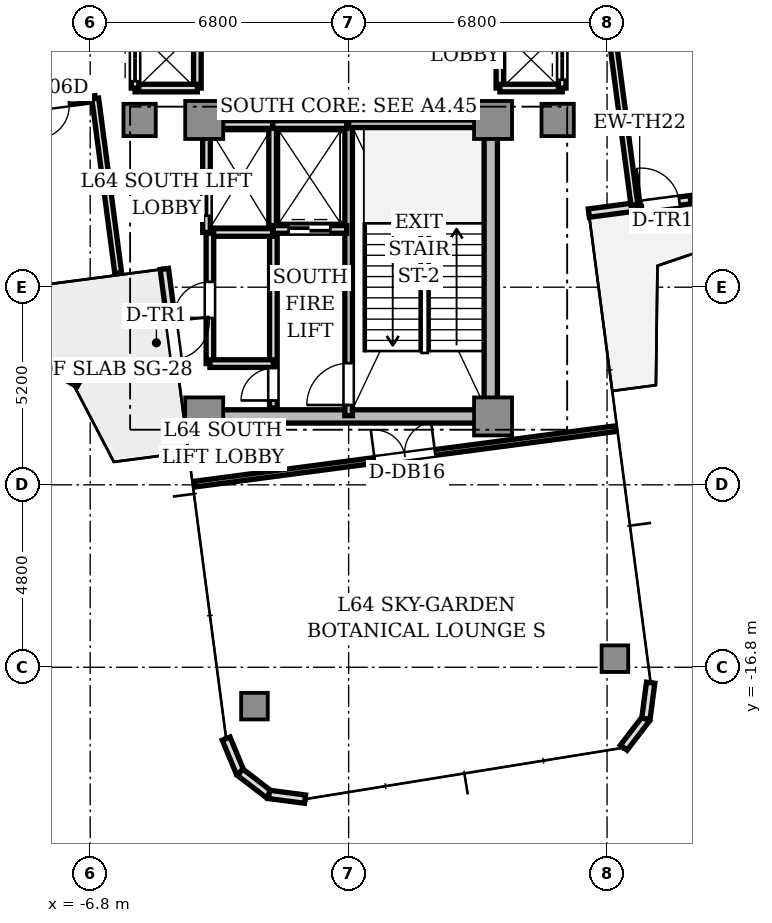
"""IFC4 building model, lengths in metres.
Left out: names, types, materials, properties, quantities, classifications, styles, units other than length and angle.
Written with IfcOpenShell. Run it as: python <this file> out.ifc"""

import sys

from ifc_helpers import new_model, si_unit, direction, frame, frame_2d, origin, origin_2d, place, context, subcontext, project, spatial, rectangle, extrude, source, transform, mapped, element, fill, save


model = new_model("IFC4")
c1 = context("Model", 3, precision=1e-05, world=origin(), true_north=direction((0.0, 1.0)))
c2 = subcontext(c1, "Body", "Model", "MODEL_VIEW")
j1 = project(units=[si_unit("LENGTHUNIT", "METRE"), si_unit("PLANEANGLEUNIT", "RADIAN")], contexts=[c1])
p1 = place(None, origin())
s1 = spatial("IfcSite", under=j1, at=p1, CompositionType="ELEMENT")
p2 = place(p1, origin())
s2 = spatial("IfcBuilding", under=s1, at=p2, CompositionType="ELEMENT")
p3 = place(p2, frame((0.0, 0.0, 229.95)))
s3 = spatial("IfcBuildingStorey", under=s2, at=p3, CompositionType="ELEMENT", Elevation=229.95)
p4 = place(p3, frame((-3.55, -10.2, 0.0), z_axis=(0.0, 0.0, 1.0), x_axis=(1.0, 0.0, 0.0)))
e1 = element("IfcWall", 1, at=p4, inside=s3, PredefinedType="SHEAR", context=c2, shape_type="SweptSolid", body=[
    extrude(rectangle(XDim=7.1, YDim=0.35, at=frame_2d((3.55, 0.0))), origin(), (0.0, 0.0, 1.0), 4.26),
])
p5 = place(p3, frame((3.74, -9.75, 0.0), z_axis=(0.0, 0.0, 1.0), x_axis=(0.0, 1.0, 0.0)))
e2 = element("IfcWall", 2, at=p5, inside=s3, PredefinedType="SHEAR", context=c2, shape_type="SweptSolid", body=[
    extrude(rectangle(XDim=6.9, YDim=0.35, at=frame_2d((3.45, 0.0))), origin(), (0.0, 0.0, 1.0), 4.26),
])
m1 = source(origin(), c2, "Body", "SweptSolid", [
    extrude(rectangle(XDim=1.0, YDim=1.0, at=origin_2d()), origin(), (0.0, 0.0, 1.0), 4.26),
])
for number, where, z_axis, x_axis in (
    (3, (-3.8, -2.4, 0.0), (0.0, 0.0, 1.0), (1.0, 0.0, 0.0)),
    (4, (3.8, -2.4, 0.0), (0.0, 0.0, 1.0), (1.0, 0.0, 0.0)),
    (5, (-3.8, -10.2, 0.0), (0.0, 0.0, 1.0), (1.0, 0.0, 0.0)),
    (6, (3.8, -10.2, 0.0), (0.0, 0.0, 1.0), (1.0, 0.0, 0.0)),
):
    element("IfcColumn", number, at=place(p3, frame(where, z_axis=z_axis, x_axis=x_axis)), inside=s3, PredefinedType="COLUMN", context=c2, shape_type="MappedRepresentation", body=[
        mapped(m1, transform((0.0, 0.0, 0.0), scale=1.0)),
    ])
m2 = source(origin(), c2, "Body", "SweptSolid", [
    extrude(rectangle(XDim=0.85, YDim=0.85, at=origin_2d()), origin(), (0.0, 0.0, 1.0), 4.26),
])
for number, where, z_axis, x_axis in (
    (7, (5.5, -2.4, 0.0), (0.0, 0.0, 1.0), (1.0, 0.0, 0.0)),
    (8, (-5.5, -2.4, 0.0), (0.0, 0.0, 1.0), (1.0, 0.0, 0.0)),
):
    element("IfcColumn", number, at=place(p3, frame(where, z_axis=z_axis, x_axis=x_axis)), inside=s3, PredefinedType="COLUMN", context=c2, shape_type="MappedRepresentation", body=[
        mapped(m2, transform((0.0, 0.0, 0.0), scale=1.0)),
    ])
m3 = source(origin(), c2, "Body", "SweptSolid", [
    extrude(rectangle(XDim=0.7, YDim=0.7, at=origin_2d()), origin(), (0.0, 0.0, 1.0), 4.26),
])
for number, where, z_axis, x_axis in (
    (9, (-2.478, -17.823, 0.0), (0.0, 0.0, 1.0), (1.0, 0.0, 0.0)),
    (10, (7.006, -16.574, 0.0), (0.0, 0.0, 1.0), (1.0, 0.0, 0.0)),
):
    element("IfcColumn", number, at=place(p3, frame(where, z_axis=z_axis, x_axis=x_axis)), inside=s3, PredefinedType="COLUMN", context=c2, shape_type="MappedRepresentation", body=[
        mapped(m3, transform((0.0, 0.0, 0.0), scale=1.0)),
    ])
p6 = place(p3, frame((6.32, -4.85, 0.0), z_axis=(0.0, 0.0, 1.0), x_axis=(0.991451525486, 0.130475563272, 0.0)))
e11 = element("IfcWall", 11, at=p6, inside=s3, PredefinedType="STANDARD", context=c2, shape_type="SweptSolid", body=[
    extrude(rectangle(XDim=2.7, YDim=0.22, at=frame_2d((1.35, 0.0))), origin(), (0.0, 0.0, 1.0), 4.26),
])
p7 = place(p6, frame((1.4, 0.0, 0.0)))
e12 = element("IfcOpeningElement", 12, at=p7, cuts=e11, PredefinedType="OPENING", context=c2, shape_type="SweptSolid", body=[
    extrude(rectangle(XDim=1.0, YDim=2.2, at=frame_2d((0.5, 1.1))), frame((0.0, 0.12, 0.0), z_axis=(0.0, -1.0, 0.0), x_axis=(1.0, 0.0, 0.0)), (0.0, 0.0, 1.0), 0.24),
])
p8 = place(p3, frame((-4.85, -6.32, 0.0), z_axis=(0.0, 0.0, 1.0), x_axis=(0.130475563272, -0.991451525486, 0.0)))
e13 = element("IfcWall", 13, at=p8, inside=s3, PredefinedType="STANDARD", context=c2, shape_type="SweptSolid", body=[
    extrude(rectangle(XDim=2.7, YDim=0.22, at=frame_2d((1.35, 0.0))), origin(), (0.0, 0.0, 1.0), 4.26),
])
p9 = place(p8, frame((1.4, 0.0, 0.0)))
e14 = element("IfcOpeningElement", 14, at=p9, cuts=e13, PredefinedType="OPENING", context=c2, shape_type="SweptSolid", body=[
    extrude(rectangle(XDim=1.0, YDim=2.2, at=frame_2d((0.5, 1.1))), frame((0.0, 0.12, 0.0), z_axis=(0.0, -1.0, 0.0), x_axis=(1.0, 0.0, 0.0)), (0.0, 0.0, 1.0), 0.24),
])
p10 = place(p3, frame((-3.223, -18.677, 0.0), z_axis=(0.0, 0.0, 1.0), x_axis=(0.382659506909, -0.923889442397, 0.0)))
e15 = element("IfcWall", 15, at=p10, inside=s3, PredefinedType="STANDARD", context=c2, shape_type="SweptSolid", body=[
    extrude(rectangle(XDim=0.958, YDim=0.22, at=frame_2d((0.479, 0.0))), origin(), (0.0, 0.0, 1.0), 4.26),
])
p11 = place(p3, frame((-2.856, -19.562, 0.0), z_axis=(0.0, 0.0, 1.0), x_axis=(0.793466811674, -0.60861352168, 0.0)))
e16 = element("IfcWall", 16, at=p11, inside=s3, PredefinedType="STANDARD", context=c2, shape_type="SweptSolid", body=[
    extrude(rectangle(XDim=0.958, YDim=0.22, at=frame_2d((0.479, 0.0))), origin(), (0.0, 0.0, 1.0), 4.26),
])
p12 = place(p3, frame((-2.096, -20.145, 0.0), z_axis=(0.0, 0.0, 1.0), x_axis=(0.991444747987, -0.130527053476, 0.0)))
e17 = element("IfcWall", 17, at=p12, inside=s3, PredefinedType="STANDARD", context=c2, shape_type="SweptSolid", body=[
    extrude(rectangle(XDim=0.958, YDim=0.22, at=frame_2d((0.479, 0.0))), origin(), (0.0, 0.0, 1.0), 4.26),
])
p13 = place(p3, frame((7.239, -18.916, 0.0), z_axis=(0.0, 0.0, 1.0), x_axis=(0.608897151398, 0.793249178392, 0.0)))
e18 = element("IfcWall", 18, at=p13, inside=s3, PredefinedType="STANDARD", context=c2, shape_type="SweptSolid", body=[
    extrude(rectangle(XDim=0.958, YDim=0.22, at=frame_2d((0.479, 0.0))), origin(), (0.0, 0.0, 1.0), 4.26),
])
p14 = place(p3, frame((7.822, -18.156, 0.0), z_axis=(0.0, 0.0, 1.0), x_axis=(0.130494070426, 0.991449089759, 0.0)))
e19 = element("IfcWall", 19, at=p14, inside=s3, PredefinedType="STANDARD", context=c2, shape_type="SweptSolid", body=[
    extrude(rectangle(XDim=0.958, YDim=0.22, at=frame_2d((0.479, 0.0))), origin(), (0.0, 0.0, 1.0), 4.26),
])
p15 = place(p3, frame((-7.985, -8.808, 0.0), z_axis=(0.0, 0.0, 1.0), x_axis=(0.862787227529, -0.505567206227, 0.0)))
e20 = element("IfcWall", 20, at=p15, inside=s3, PredefinedType="PARAPET", context=c2, shape_type="SweptSolid", body=[
    extrude(rectangle(XDim=1.029, YDim=0.2, at=frame_2d((0.514, 0.0))), origin(), (0.0, 0.0, 1.0), 0.65),
])
p16 = place(p3, frame((0.0, -10.18, 0.0), z_axis=(0.0, 0.0, 1.0), x_axis=(0.0, 1.0, 0.0)))
e21 = element("IfcWall", 21, at=p16, inside=s3, PredefinedType="SOLIDWALL", context=c2, shape_type="SweptSolid", body=[
    extrude(rectangle(XDim=7.68, YDim=0.2, at=frame_2d((3.84, 0.0))), origin(), (0.0, 0.0, 1.0), 4.26),
])
p17 = place(p16, frame((0.28, 0.0, 0.0)))
e22 = element("IfcOpeningElement", 22, at=p17, cuts=e21, PredefinedType="OPENING", context=c2, shape_type="SweptSolid", body=[
    extrude(rectangle(XDim=1.1, YDim=2.15, at=frame_2d((0.55, 1.075))), frame((0.0, 0.11, 0.0), z_axis=(0.0, -1.0, 0.0), x_axis=(1.0, 0.0, 0.0)), (0.0, 0.0, 1.0), 0.22),
])
p18 = place(p3, frame((0.0, -2.5, 0.0), z_axis=(0.0, 0.0, 1.0), x_axis=(1.0, 0.0, 0.0)))
e23 = element("IfcWall", 23, at=p18, inside=s3, PredefinedType="SOLIDWALL", context=c2, shape_type="SweptSolid", body=[
    extrude(rectangle(XDim=3.72, YDim=0.2, at=frame_2d((1.86, 0.0))), origin(), (0.0, 0.0, 1.0), 4.26),
])
p19 = place(p3, frame((-1.98, -9.98, 0.0), z_axis=(0.0, 0.0, 1.0), x_axis=(0.0, 1.0, 0.0)))
e24 = element("IfcWall", 24, at=p19, inside=s3, PredefinedType="SOLIDWALL", context=c2, shape_type="SweptSolid", body=[
    extrude(rectangle(XDim=4.66, YDim=0.2, at=frame_2d((2.33, 0.0))), origin(), (0.0, 0.0, 1.0), 3.81),
])
p20 = place(p19, frame((0.2, 0.0, 0.0)))
e25 = element("IfcOpeningElement", 25, at=p20, cuts=e24, PredefinedType="OPENING", context=c2, shape_type="SweptSolid", body=[
    extrude(rectangle(XDim=0.85, YDim=2.1, at=frame_2d((0.425, 1.05))), frame((0.0, 0.11, 0.0), z_axis=(0.0, -1.0, 0.0), x_axis=(1.0, 0.0, 0.0)), (0.0, 0.0, 1.0), 0.22),
])
p21 = place(p3, frame((-2.0, -5.28, 0.0), z_axis=(0.0, 0.0, 1.0), x_axis=(0.0, 1.0, 0.0)))
e26 = element("IfcWall", 26, at=p21, inside=s3, PredefinedType="SOLIDWALL", context=c2, shape_type="SweptSolid", body=[
    extrude(rectangle(XDim=2.78, YDim=0.2, at=frame_2d((1.39, 0.0))), origin(), (0.0, 0.0, 1.0), 3.81),
])
p22 = place(p3, frame((-2.0, -2.52, 0.0), z_axis=(0.0, 0.0, 1.0), x_axis=(1.0, 0.0, 0.0)))
e27 = element("IfcWall", 27, at=p22, inside=s3, PredefinedType="SOLIDWALL", context=c2, shape_type="SweptSolid", body=[
    extrude(rectangle(XDim=1.95, YDim=0.2, at=frame_2d((0.975, 0.0))), origin(), (0.0, 0.0, 1.0), 3.81),
])
p23 = place(p3, frame((-1.98, -5.28, 0.0), z_axis=(0.0, 0.0, 1.0), x_axis=(1.0, 0.0, 0.0)))
e28 = element("IfcWall", 28, at=p23, inside=s3, PredefinedType="SOLIDWALL", context=c2, shape_type="SweptSolid", body=[
    extrude(rectangle(XDim=1.93, YDim=0.2, at=frame_2d((0.965, 0.0))), origin(), (0.0, 0.0, 1.0), 3.81),
])
p24 = place(p23, frame((0.4, 0.0, 0.0)))
e29 = element("IfcOpeningElement", 29, at=p24, cuts=e28, PredefinedType="OPENING", context=c2, shape_type="SweptSolid", body=[
    extrude(rectangle(XDim=1.1, YDim=2.2, at=frame_2d((0.55, 1.1))), frame((0.0, 0.11, 0.0), z_axis=(0.0, -1.0, 0.0), x_axis=(1.0, 0.0, 0.0)), (0.0, 0.0, 1.0), 0.22),
])
p25 = place(p3, frame((-3.32, -2.52, 0.0), z_axis=(0.0, 0.0, 1.0), x_axis=(1.0, 0.0, 0.0)))
e30 = element("IfcWall", 30, at=p25, inside=s3, PredefinedType="SOLIDWALL", context=c2, shape_type="SweptSolid", body=[
    extrude(rectangle(XDim=1.32, YDim=0.2, at=frame_2d((0.66, 0.0))), origin(), (0.0, 0.0, 1.0), 3.81),
])
p26 = place(p3, frame((-3.74, -5.36, 0.0), z_axis=(0.0, 0.0, 1.0), x_axis=(1.0, 0.0, 0.0)))
e31 = element("IfcWall", 31, at=p26, inside=s3, PredefinedType="SOLIDWALL", context=c2, shape_type="SweptSolid", body=[
    extrude(rectangle(XDim=1.74, YDim=0.2, at=frame_2d((0.87, 0.0))), origin(), (0.0, 0.0, 1.0), 3.81),
])
p27 = place(p3, frame((-3.74, -5.36, 0.0), z_axis=(0.0, 0.0, 1.0), x_axis=(0.0, 1.0, 0.0)))
e32 = element("IfcWall", 32, at=p27, inside=s3, PredefinedType="SOLIDWALL", context=c2, shape_type="SweptSolid", body=[
    extrude(rectangle(XDim=2.48, YDim=0.2, at=frame_2d((1.24, 0.0))), origin(), (0.0, 0.0, 1.0), 3.81),
])
p28 = place(p27, frame((0.44, 0.0, 0.0)))
e33 = element("IfcOpeningElement", 33, at=p28, cuts=e32, PredefinedType="OPENING", context=c2, shape_type="SweptSolid", body=[
    extrude(rectangle(XDim=1.2, YDim=2.2, at=frame_2d((0.6, 1.1))), frame((0.0, 0.11, 0.0), z_axis=(0.0, -1.0, 0.0), x_axis=(1.0, 0.0, 0.0)), (0.0, 0.0, 1.0), 0.22),
])
p29 = place(p3, frame((3.98, -1.56, 0.0), z_axis=(0.0, 0.0, 1.0), x_axis=(0.0, 1.0, 0.0)))
e34 = element("IfcWall", 34, at=p29, inside=s3, PredefinedType="SOLIDWALL", context=c2, shape_type="SweptSolid", body=[
    extrude(rectangle(XDim=3.12, YDim=0.2, at=frame_2d((1.56, 0.0))), origin(), (0.0, 0.0, 1.0), 3.48),
])
p30 = place(p3, frame((3.98, -1.56, 0.0), z_axis=(0.0, 0.0, 1.0), x_axis=(1.0, 0.0, 0.0)))
e35 = element("IfcWall", 35, at=p30, inside=s3, PredefinedType="SOLIDWALL", context=c2, shape_type="SweptSolid", body=[
    extrude(rectangle(XDim=1.64, YDim=0.2, at=frame_2d((0.82, 0.0))), origin(), (0.0, 0.0, 1.0), 3.81),
])
p31 = place(p3, frame((5.62, -1.56, 0.0), z_axis=(0.0, 0.0, 1.0), x_axis=(0.0, 1.0, 0.0)))
e36 = element("IfcWall", 36, at=p31, inside=s3, PredefinedType="SOLIDWALL", context=c2, shape_type="SweptSolid", body=[
    extrude(rectangle(XDim=1.56, YDim=0.2, at=frame_2d((0.78, 0.0))), origin(), (0.0, 0.0, 1.0), 3.81),
])
p32 = place(p31, frame((0.22, 0.0, 0.0)))
e37 = element("IfcOpeningElement", 37, at=p32, cuts=e36, PredefinedType="OPENING", context=c2, shape_type="SweptSolid", body=[
    extrude(rectangle(XDim=1.1, YDim=2.2, at=frame_2d((0.55, 1.1))), frame((0.0, 0.11, 0.0), z_axis=(0.0, -1.0, 0.0), x_axis=(1.0, 0.0, 0.0)), (0.0, 0.0, 1.0), 0.22),
])
p33 = place(p3, frame((-3.98, -1.56, 0.0), z_axis=(0.0, 0.0, 1.0), x_axis=(0.0, 1.0, 0.0)))
e38 = element("IfcWall", 38, at=p33, inside=s3, PredefinedType="SOLIDWALL", context=c2, shape_type="SweptSolid", body=[
    extrude(rectangle(XDim=3.12, YDim=0.2, at=frame_2d((1.56, 0.0))), origin(), (0.0, 0.0, 1.0), 3.48),
])
p34 = place(p3, frame((-5.62, -1.56, 0.0), z_axis=(0.0, 0.0, 1.0), x_axis=(1.0, 0.0, 0.0)))
e39 = element("IfcWall", 39, at=p34, inside=s3, PredefinedType="SOLIDWALL", context=c2, shape_type="SweptSolid", body=[
    extrude(rectangle(XDim=1.64, YDim=0.2, at=frame_2d((0.82, 0.0))), origin(), (0.0, 0.0, 1.0), 3.81),
])
p35 = place(p3, frame((-5.62, -1.56, 0.0), z_axis=(0.0, 0.0, 1.0), x_axis=(0.0, 1.0, 0.0)))
e40 = element("IfcWall", 40, at=p35, inside=s3, PredefinedType="SOLIDWALL", context=c2, shape_type="SweptSolid", body=[
    extrude(rectangle(XDim=1.56, YDim=0.2, at=frame_2d((0.78, 0.0))), origin(), (0.0, 0.0, 1.0), 3.81),
])
p36 = place(p35, frame((0.18, 0.0, 0.0)))
e41 = element("IfcOpeningElement", 41, at=p36, cuts=e40, PredefinedType="OPENING", context=c2, shape_type="SweptSolid", body=[
    extrude(rectangle(XDim=1.2, YDim=2.2, at=frame_2d((0.6, 1.1))), frame((0.0, 0.11, 0.0), z_axis=(0.0, -1.0, 0.0), x_axis=(1.0, 0.0, 0.0)), (0.0, 0.0, 1.0), 0.22),
])
p37 = place(p3, frame((-3.65, -8.81, 0.0), z_axis=(0.0, 0.0, 1.0), x_axis=(0.0, 1.0, 0.0)))
e42 = element("IfcWall", 42, at=p37, inside=s3, PredefinedType="SOLIDWALL", context=c2, shape_type="SweptSolid", body=[
    extrude(rectangle(XDim=3.43, YDim=0.2, at=frame_2d((1.715, 0.0))), origin(), (0.0, 0.0, 1.0), 3.81),
])
p38 = place(p37, frame((1.2, 0.0, 0.0)))
e43 = element("IfcOpeningElement", 43, at=p38, cuts=e42, PredefinedType="OPENING", context=c2, shape_type="SweptSolid", body=[
    extrude(rectangle(XDim=0.95, YDim=2.15, at=frame_2d((0.475, 1.075))), frame((0.0, 0.11, 0.0), z_axis=(0.0, -1.0, 0.0), x_axis=(1.0, 0.0, 0.0)), (0.0, 0.0, 1.0), 0.22),
])
p39 = place(p3, frame((-3.65, -8.81, 0.0), z_axis=(0.0, 0.0, 1.0), x_axis=(1.0, 0.0, 0.0)))
e44 = element("IfcWall", 44, at=p39, inside=s3, PredefinedType="SOLIDWALL", context=c2, shape_type="SweptSolid", body=[
    extrude(rectangle(XDim=1.67, YDim=0.2, at=frame_2d((0.835, 0.0))), origin(), (0.0, 0.0, 1.0), 3.81),
])
p40 = place(p3, frame((7.52, -4.641, 0.0), z_axis=(0.0, 0.0, 1.0), x_axis=(-0.130530849518, 0.991444248218, 0.0)))
e45 = element("IfcWall", 45, at=p40, inside=s3, PredefinedType="PARTITIONING", context=c2, shape_type="SweptSolid", body=[
    extrude(rectangle(XDim=4.633, YDim=0.18, at=frame_2d((2.316, 0.0))), origin(), (0.0, 0.0, 1.0), 3.81),
])
p41 = place(p3, frame((-6.667, -1.836, 0.0), z_axis=(0.0, 0.0, 1.0), x_axis=(-0.991443273426, -0.130538253316, 0.0)))
e46 = element("IfcWall", 46, at=p41, inside=s3, PredefinedType="PARTITIONING", context=c2, shape_type="SweptSolid", body=[
    extrude(rectangle(XDim=13.047, YDim=0.15, at=frame_2d((6.523, 0.0))), origin(), (0.0, 0.0, 1.0), 3.81),
])
p42 = place(p41, frame((0.7, 0.0, 0.0)))
e47 = element("IfcOpeningElement", 47, at=p42, cuts=e46, PredefinedType="OPENING", context=c2, shape_type="SweptSolid", body=[
    extrude(rectangle(XDim=0.85, YDim=2.1, at=frame_2d((0.425, 1.05))), frame((0.0, 0.085, 0.0), z_axis=(0.0, -1.0, 0.0), x_axis=(1.0, 0.0, 0.0)), (0.0, 0.0, 1.0), 0.17),
])
p43 = place(p41, frame((4.878, 0.0, 0.0)))
e48 = element("IfcOpeningElement", 48, at=p43, cuts=e46, PredefinedType="OPENING", context=c2, shape_type="SweptSolid", body=[
    extrude(rectangle(XDim=0.85, YDim=2.1, at=frame_2d((0.425, 1.05))), frame((0.0, 0.085, 0.0), z_axis=(0.0, -1.0, 0.0), x_axis=(1.0, 0.0, 0.0)), (0.0, 0.0, 1.0), 0.17),
])
p44 = place(p41, frame((9.314, 0.0, 0.0)))
e49 = element("IfcOpeningElement", 49, at=p44, cuts=e46, PredefinedType="OPENING", context=c2, shape_type="SweptSolid", body=[
    extrude(rectangle(XDim=0.85, YDim=2.1, at=frame_2d((0.425, 1.05))), frame((0.0, 0.085, 0.0), z_axis=(0.0, -1.0, 0.0), x_axis=(1.0, 0.0, 0.0)), (0.0, 0.0, 1.0), 0.17),
])
p45 = place(p3, frame((-6.915, 0.048, 0.0), z_axis=(0.0, 0.0, 1.0), x_axis=(-0.991443592282, -0.130535831567, 0.0)))
e50 = element("IfcWall", 50, at=p45, inside=s3, PredefinedType="PARTITIONING", context=c2, shape_type="SweptSolid", body=[
    extrude(rectangle(XDim=13.047, YDim=0.15, at=frame_2d((6.523, 0.0))), origin(), (0.0, 0.0, 1.0), 3.81),
])
p46 = place(p45, frame((1.685, 0.0, 0.0)))
e51 = element("IfcOpeningElement", 51, at=p46, cuts=e50, PredefinedType="OPENING", context=c2, shape_type="SweptSolid", body=[
    extrude(rectangle(XDim=0.85, YDim=2.1, at=frame_2d((0.425, 1.05))), frame((0.0, 0.085, 0.0), z_axis=(0.0, -1.0, 0.0), x_axis=(1.0, 0.0, 0.0)), (0.0, 0.0, 1.0), 0.17),
])
p47 = place(p45, frame((8.164, 0.0, 0.0)))
e52 = element("IfcOpeningElement", 52, at=p47, cuts=e50, PredefinedType="OPENING", context=c2, shape_type="SweptSolid", body=[
    extrude(rectangle(XDim=0.85, YDim=2.1, at=frame_2d((0.425, 1.05))), frame((0.0, 0.085, 0.0), z_axis=(0.0, -1.0, 0.0), x_axis=(1.0, 0.0, 0.0)), (0.0, 0.0, 1.0), 0.17),
])
p48 = place(p3, frame((-6.667, -1.836, 0.0), z_axis=(0.0, 0.0, 1.0), x_axis=(0.130530849518, -0.991444248218, 0.0)))
e53 = element("IfcWall", 53, at=p48, inside=s3, PredefinedType="PARTITIONING", context=c2, shape_type="SweptSolid", body=[
    extrude(rectangle(XDim=4.633, YDim=0.18, at=frame_2d((2.316, 0.0))), origin(), (0.0, 0.0, 1.0), 3.81),
])
p49 = place(p3, frame((-4.054, -11.982, 0.0), z_axis=(0.0, 0.0, 1.0), x_axis=(0.991443873416, 0.130533696284, 0.0)))
e54 = element("IfcWall", 54, at=p49, inside=s3, PredefinedType="PARTITIONING", context=c2, shape_type="SweptSolid", body=[
    extrude(rectangle(XDim=11.166, YDim=0.15, at=frame_2d((5.583, 0.0))), origin(), (0.0, 0.0, 1.0), 3.81),
])
p50 = place(p49, frame((4.783, 0.0, 0.0)))
e55 = element("IfcOpeningElement", 55, at=p50, cuts=e54, PredefinedType="OPENING", context=c2, shape_type="SweptSolid", body=[
    extrude(rectangle(XDim=1.6, YDim=2.25, at=frame_2d((0.8, 1.125))), frame((0.0, 0.085, 0.0), z_axis=(0.0, -1.0, 0.0), x_axis=(1.0, 0.0, 0.0)), (0.0, 0.0, 1.0), 0.17),
])
m4 = source(origin(), c2, "Body", "SweptSolid", [
    extrude(rectangle(XDim=1.0, YDim=0.05, at=origin_2d()), origin(), (0.0, 0.0, 1.0), 2.2),
])
p51 = place(p7, frame((0.5, 0.0, 0.0)))
e56 = element("IfcDoor", 56, at=p51, inside=s3, OperationType="SINGLE_SWING_LEFT", PredefinedType="DOOR", context=c2, shape_type="MappedRepresentation", body=[
    mapped(m4, transform((0.0, 0.0, 0.0), scale=1.0)),
])
fill(e12, e56)
p52 = place(p9, frame((0.5, 0.0, 0.0)))
e57 = element("IfcDoor", 57, at=p52, inside=s3, OperationType="SINGLE_SWING_LEFT", PredefinedType="DOOR", context=c2, shape_type="MappedRepresentation", body=[
    mapped(m4, transform((0.0, 0.0, 0.0), scale=1.0)),
])
fill(e14, e57)
m5 = source(origin(), c2, "Body", "SweptSolid", [
    extrude(rectangle(XDim=1.1, YDim=0.05, at=origin_2d()), origin(), (0.0, 0.0, 1.0), 2.15),
])
p53 = place(p17, frame((0.55, 0.0, 0.0)))
e58 = element("IfcDoor", 58, at=p53, inside=s3, OperationType="SINGLE_SWING_LEFT", PredefinedType="DOOR", context=c2, shape_type="MappedRepresentation", body=[
    mapped(m5, transform((0.0, 0.0, 0.0), scale=1.0)),
])
fill(e22, e58)
m6 = source(origin(), c2, "Body", "SweptSolid", [
    extrude(rectangle(XDim=0.85, YDim=0.05, at=origin_2d()), origin(), (0.0, 0.0, 1.0), 2.1),
])
p54 = place(p20, frame((0.425, 0.0, 0.0)))
e59 = element("IfcDoor", 59, at=p54, inside=s3, OperationType="SINGLE_SWING_LEFT", PredefinedType="DOOR", context=c2, shape_type="MappedRepresentation", body=[
    mapped(m6, transform((0.0, 0.0, 0.0), scale=1.0)),
])
fill(e25, e59)
m7 = source(origin(), c2, "Body", "SweptSolid", [
    extrude(rectangle(XDim=1.1, YDim=0.05, at=origin_2d()), origin(), (0.0, 0.0, 1.0), 2.2),
])
p55 = place(p24, frame((0.55, 0.0, 0.0)))
e60 = element("IfcDoor", 60, at=p55, inside=s3, OperationType="DOUBLE_DOOR_SLIDING", PredefinedType="DOOR", context=c2, shape_type="MappedRepresentation", body=[
    mapped(m7, transform((0.0, 0.0, 0.0), scale=1.0)),
])
fill(e29, e60)
m8 = source(origin(), c2, "Body", "SweptSolid", [
    extrude(rectangle(XDim=1.2, YDim=0.05, at=origin_2d()), origin(), (0.0, 0.0, 1.0), 2.2),
])
p56 = place(p28, frame((0.6, 0.0, 0.0)))
e61 = element("IfcDoor", 61, at=p56, inside=s3, OperationType="DOUBLE_DOOR_SLIDING", PredefinedType="DOOR", context=c2, shape_type="MappedRepresentation", body=[
    mapped(m8, transform((0.0, 0.0, 0.0), scale=1.0)),
])
fill(e33, e61)
p57 = place(p32, frame((0.55, 0.0, 0.0)))
e62 = element("IfcDoor", 62, at=p57, inside=s3, OperationType="DOUBLE_DOOR_SLIDING", PredefinedType="DOOR", context=c2, shape_type="MappedRepresentation", body=[
    mapped(m7, transform((0.0, 0.0, 0.0), scale=1.0)),
])
fill(e37, e62)
p58 = place(p36, frame((0.6, 0.0, 0.0)))
e63 = element("IfcDoor", 63, at=p58, inside=s3, OperationType="DOUBLE_DOOR_SLIDING", PredefinedType="DOOR", context=c2, shape_type="MappedRepresentation", body=[
    mapped(m8, transform((0.0, 0.0, 0.0), scale=1.0)),
])
fill(e41, e63)
m9 = source(origin(), c2, "Body", "SweptSolid", [
    extrude(rectangle(XDim=0.95, YDim=0.05, at=origin_2d()), origin(), (0.0, 0.0, 1.0), 2.15),
])
p59 = place(p38, frame((0.475, 0.0, 0.0)))
e64 = element("IfcDoor", 64, at=p59, inside=s3, OperationType="SINGLE_SWING_LEFT", PredefinedType="DOOR", context=c2, shape_type="MappedRepresentation", body=[
    mapped(m9, transform((0.0, 0.0, 0.0), scale=1.0)),
])
fill(e43, e64)
p60 = place(p42, frame((0.425, 0.0, 0.0)))
e65 = element("IfcDoor", 65, at=p60, inside=s3, OperationType="SINGLE_SWING_RIGHT", PredefinedType="DOOR", context=c2, shape_type="MappedRepresentation", body=[
    mapped(m6, transform((0.0, 0.0, 0.0), scale=1.0)),
])
fill(e47, e65)
m10 = source(origin(), c2, "Body", "SweptSolid", [
    extrude(rectangle(XDim=1.6, YDim=0.05, at=origin_2d()), origin(), (0.0, 0.0, 1.0), 2.25),
])
p61 = place(p50, frame((0.8, 0.0, 0.0)))
e66 = element("IfcDoor", 66, at=p61, inside=s3, OperationType="DOUBLE_DOOR_SINGLE_SWING", PredefinedType="DOOR", context=c2, shape_type="MappedRepresentation", body=[
    mapped(m10, transform((0.0, 0.0, 0.0), scale=1.0)),
])
fill(e55, e66)
save(model, sys.argv[1])
